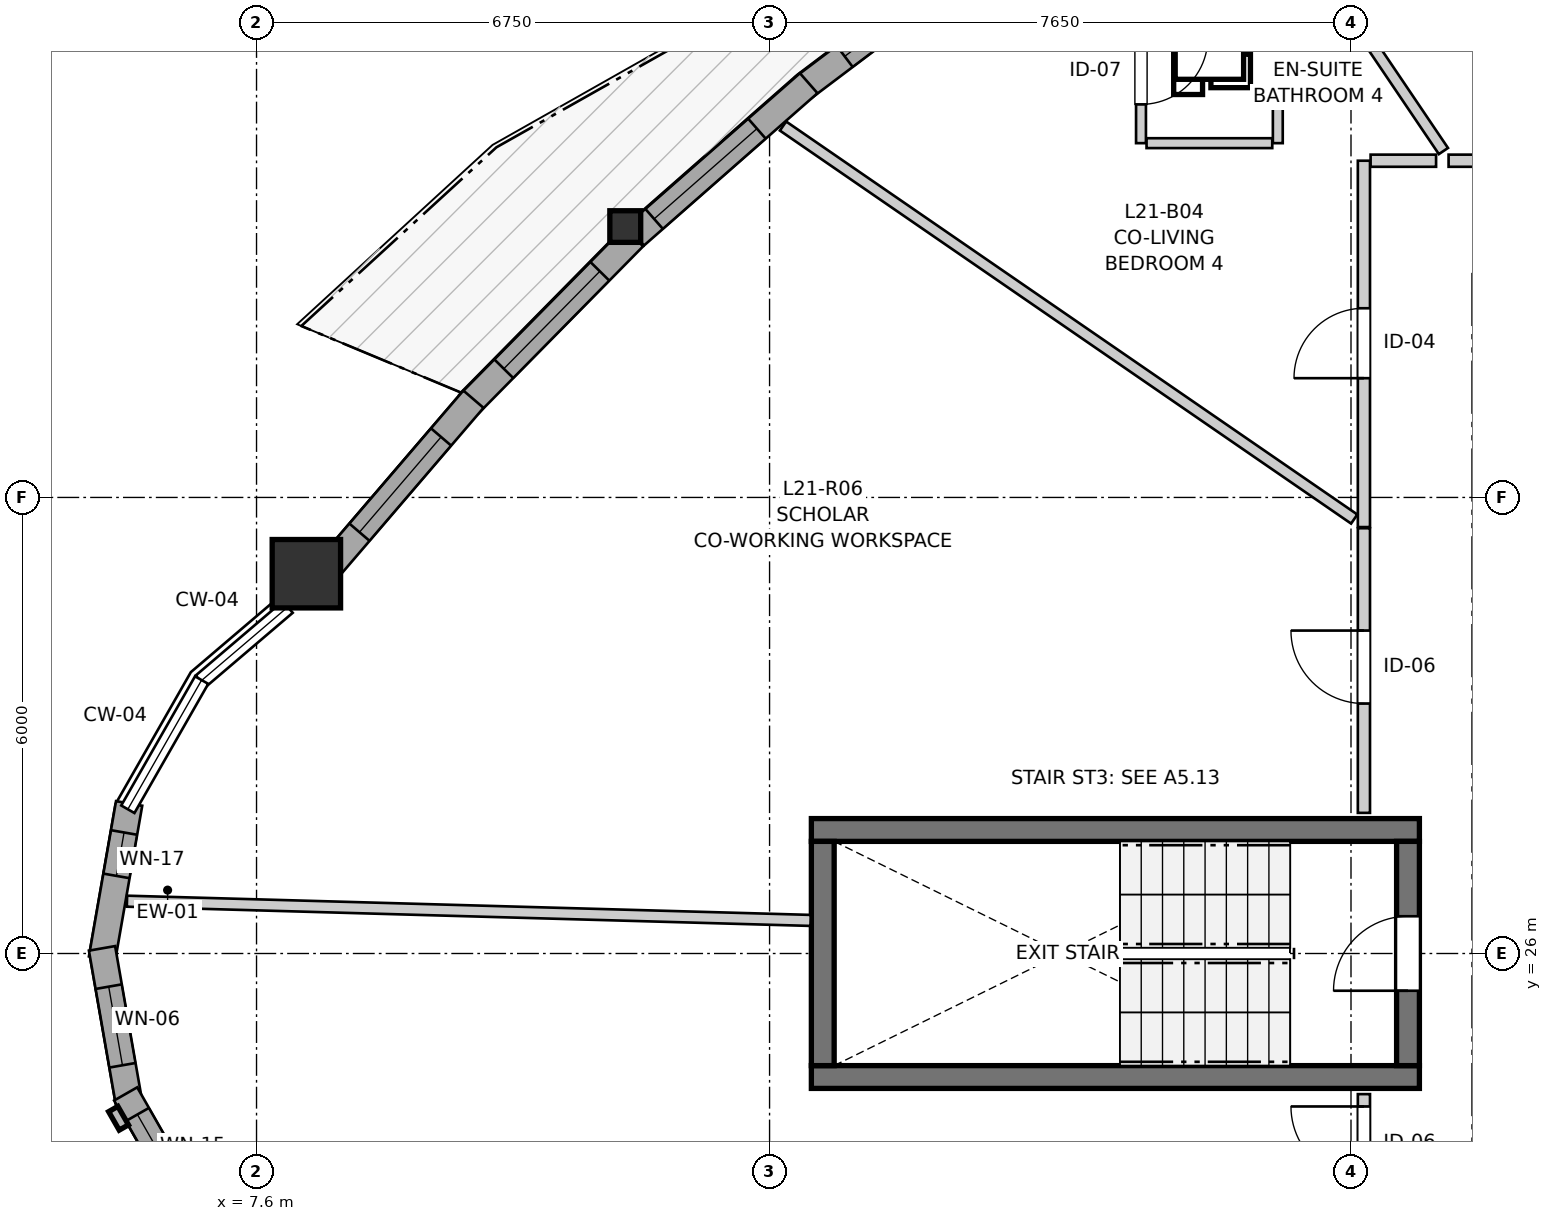
"""IFC4 building model, lengths in metres.
Left out: names, types, materials, properties, quantities, classifications, styles, units other than length and angle.
Written with IfcOpenShell. Run it as: python <this file> out.ifc"""

import sys

from ifc_helpers import new_model, si_unit, direction, frame, frame_2d, origin, origin_2d, place, context, subcontext, project, spatial, rectangle, i_section, extrude, source, transform, mapped, element, fill, save


model = new_model("IFC4")
c1 = context("Model", 3, precision=1e-05, world=origin(), true_north=direction((0.0, 1.0)))
c2 = subcontext(c1, "Body", "Model", "MODEL_VIEW")
j1 = project(units=[si_unit("LENGTHUNIT", "METRE"), si_unit("PLANEANGLEUNIT", "RADIAN")], contexts=[c1])
p1 = place(None, origin())
s1 = spatial("IfcSite", under=j1, at=p1, CompositionType="ELEMENT")
p2 = place(p1, origin())
s2 = spatial("IfcBuilding", under=s1, at=p2, CompositionType="ELEMENT")
p3 = place(p2, frame((0.0, 0.0, 73.6)))
s3 = spatial("IfcBuildingStorey", under=s2, at=p3, CompositionType="ELEMENT", Elevation=73.6)
for number, where, z_axis, x_axis in (
    (1, (14.9, 24.375, 0.0), (0.0, 0.0, 1.0), (1.0, 0.0, 0.0)),
    (2, (22.9, 27.625, 0.0), (0.0, 0.0, 1.0), (-1.0, 0.0, 0.0)),
):
    element("IfcWall", number, at=place(p3, frame(where, z_axis=z_axis, x_axis=x_axis)), inside=s3, PredefinedType="SHEAR", context=c2, shape_type="SweptSolid", body=[
        extrude(rectangle(XDim=8.0, YDim=0.3, at=frame_2d((4.0, 0.0))), origin(), (0.0, 0.0, 1.0), 2.95),
    ])
p4 = place(p3, frame((15.05, 27.475, 0.0), z_axis=(0.0, 0.0, 1.0), x_axis=(0.0, -1.0, 0.0)))
e3 = element("IfcWall", 3, at=p4, inside=s3, PredefinedType="SHEAR", context=c2, shape_type="SweptSolid", body=[
    extrude(rectangle(XDim=2.95, YDim=0.3, at=frame_2d((1.475, 0.0))), origin(), (0.0, 0.0, 1.0), 2.95),
])
p5 = place(p3, frame((22.75, 24.525, 0.0), z_axis=(0.0, 0.0, 1.0), x_axis=(0.0, 1.0, 0.0)))
e4 = element("IfcWall", 4, at=p5, inside=s3, PredefinedType="SHEAR", context=c2, shape_type="SweptSolid", body=[
    extrude(rectangle(XDim=2.95, YDim=0.3, at=frame_2d((1.475, 0.0))), origin(), (0.0, 0.0, 1.0), 2.95),
])
p6 = place(p5, frame((0.985, 0.0, 0.0)))
e5 = element("IfcOpeningElement", 5, at=p6, cuts=e4, PredefinedType="OPENING", context=c2, shape_type="SweptSolid", body=[
    extrude(rectangle(XDim=0.98, YDim=2.15, at=frame_2d((0.49, 1.075))), frame((0.0, 0.16, 0.0), z_axis=(0.0, -1.0, 0.0), x_axis=(1.0, 0.0, 0.0)), (0.0, 0.0, 1.0), 0.32),
])
m1 = source(origin(), c2, "Body", "SweptSolid", [
    extrude(rectangle(XDim=0.9, YDim=0.9, at=origin_2d()), origin(), (0.0, 0.0, 1.0), 2.95),
])
p7 = place(p3, frame((8.256, 30.997, 0.0), z_axis=(0.0, 0.0, 1.0), x_axis=(1.0, 0.0, 0.0)))
e6 = element("IfcColumn", 6, at=p7, inside=s3, PredefinedType="COLUMN", context=c2, shape_type="MappedRepresentation", body=[
    mapped(m1, transform((0.0, 0.0, 0.0), x_axis=(1.0, 0.0, 0.0), y_axis=(0.0, 1.0, 0.0), z_axis=(0.0, 0.0, 1.0), scale=1.0)),
])
m2 = source(origin(), c2, "Body", "SweptSolid", [
    extrude(i_section(OverallWidth=0.406, OverallDepth=0.416, WebThickness=0.027, FlangeThickness=0.044, FilletRadius=0.015, at=origin_2d()), origin(), (0.0, 0.0, 1.0), 2.95),
])
p8 = place(p3, frame((12.451, 35.564, 0.0), z_axis=(0.0, 0.0, 1.0), x_axis=(1.0, 0.0, 0.0)))
e7 = element("IfcColumn", 7, at=p8, inside=s3, PredefinedType="PILASTER", context=c2, shape_type="MappedRepresentation", body=[
    mapped(m2, transform((0.0, 0.0, 0.0), x_axis=(1.0, 0.0, 0.0), y_axis=(0.0, 1.0, 0.0), z_axis=(0.0, 0.0, 1.0), scale=1.0)),
])
p9 = place(p3, frame((5.924, 27.975, 0.0), z_axis=(0.0, 0.0, 1.0), x_axis=(-0.172166087538, -0.985067935881, 0.0)))
e8 = element("IfcWall", 8, at=p9, inside=s3, PredefinedType="SOLIDWALL", context=c2, shape_type="SweptSolid", body=[
    extrude(rectangle(XDim=2.073, YDim=0.35, at=frame_2d((1.037, 0.0))), origin(), (0.0, 0.0, 1.0), 2.48),
])
p10 = place(p9, frame((0.388, 0.0, 0.82)))
e9 = element("IfcOpeningElement", 9, at=p10, cuts=e8, PredefinedType="OPENING", context=c2, shape_type="SweptSolid", body=[
    extrude(rectangle(XDim=0.58, YDim=1.35, at=frame_2d((0.29, 0.675))), frame((0.0, 0.185, 0.0), z_axis=(0.0, -1.0, 0.0), x_axis=(1.0, 0.0, 0.0)), (0.0, 0.0, 1.0), 0.37),
])
p11 = place(p3, frame((5.567, 26.068, 0.0), z_axis=(0.0, 0.0, 1.0), x_axis=(0.172166087538, -0.985067935881, 0.0)))
e10 = element("IfcWall", 10, at=p11, inside=s3, PredefinedType="SOLIDWALL", context=c2, shape_type="SweptSolid", body=[
    extrude(rectangle(XDim=2.073, YDim=0.35, at=frame_2d((1.037, 0.0))), origin(), (0.0, 0.0, 1.0), 2.48),
])
p12 = place(p11, frame((0.511, 0.0, 0.82)))
e11 = element("IfcOpeningElement", 11, at=p12, cuts=e10, PredefinedType="OPENING", context=c2, shape_type="SweptSolid", body=[
    extrude(rectangle(XDim=1.05, YDim=1.45, at=frame_2d((0.525, 0.725))), frame((0.0, 0.185, 0.0), z_axis=(0.0, -1.0, 0.0), x_axis=(1.0, 0.0, 0.0)), (0.0, 0.0, 1.0), 0.37),
])
p13 = place(p3, frame((5.878, 24.153, 0.0), z_axis=(0.0, 0.0, 1.0), x_axis=(0.496037473582, -0.868301114132, 0.0)))
e12 = element("IfcWall", 12, at=p13, inside=s3, PredefinedType="SOLIDWALL", context=c2, shape_type="SweptSolid", body=[
    extrude(rectangle(XDim=2.073, YDim=0.35, at=frame_2d((1.037, 0.0))), origin(), (0.0, 0.0, 1.0), 2.48),
])
p14 = place(p13, frame((0.312, 0.0, 0.82)))
e13 = element("IfcOpeningElement", 13, at=p14, cuts=e12, PredefinedType="OPENING", context=c2, shape_type="SweptSolid", body=[
    extrude(rectangle(XDim=1.45, YDim=1.25, at=frame_2d((0.725, 0.625))), frame((0.0, 0.185, 0.0), z_axis=(0.0, -1.0, 0.0), x_axis=(1.0, 0.0, 0.0)), (0.0, 0.0, 1.0), 0.37),
])
p15 = place(p3, frame((17.031, 39.079, 0.0), z_axis=(0.0, 0.0, 1.0), x_axis=(-0.798385341516, -0.602146864521, 0.0)))
e14 = element("IfcWall", 14, at=p15, inside=s3, PredefinedType="SOLIDWALL", context=c2, shape_type="SweptSolid", body=[
    extrude(rectangle(XDim=2.799, YDim=0.35, at=frame_2d((1.4, 0.0))), origin(), (0.0, 0.0, 1.0), 2.48),
])
p16 = place(p15, frame((0.67, 0.0, 0.82)))
e15 = element("IfcOpeningElement", 15, at=p16, cuts=e14, PredefinedType="OPENING", context=c2, shape_type="SweptSolid", body=[
    extrude(rectangle(XDim=1.45, YDim=1.25, at=frame_2d((0.725, 0.625))), frame((0.0, 0.185, 0.0), z_axis=(0.0, -1.0, 0.0), x_axis=(1.0, 0.0, 0.0)), (0.0, 0.0, 1.0), 0.37),
])
p17 = place(p3, frame((14.865, 37.45, 0.0), z_axis=(0.0, 0.0, 1.0), x_axis=(-0.751505335107, -0.659727012715, 0.0)))
e16 = element("IfcWall", 16, at=p17, inside=s3, PredefinedType="SOLIDWALL", context=c2, shape_type="SweptSolid", body=[
    extrude(rectangle(XDim=3.038, YDim=0.35, at=frame_2d((1.519, 0.0))), origin(), (0.0, 0.0, 1.0), 2.48),
])
p18 = place(p17, frame((0.906, 0.0, 0.82)))
e17 = element("IfcOpeningElement", 17, at=p18, cuts=e16, PredefinedType="OPENING", context=c2, shape_type="SweptSolid", body=[
    extrude(rectangle(XDim=1.8, YDim=1.45, at=frame_2d((0.9, 0.725))), frame((0.0, 0.185, 0.0), z_axis=(0.0, -1.0, 0.0), x_axis=(1.0, 0.0, 0.0)), (0.0, 0.0, 1.0), 0.37),
])
p19 = place(p3, frame((12.562, 35.427, 0.0), z_axis=(0.0, 0.0, 1.0), x_axis=(-0.701949387032, -0.712226830473, 0.0)))
e18 = element("IfcWall", 18, at=p19, inside=s3, PredefinedType="SOLIDWALL", context=c2, shape_type="SweptSolid", body=[
    extrude(rectangle(XDim=3.088, YDim=0.35, at=frame_2d((1.544, 0.0))), origin(), (0.0, 0.0, 1.0), 2.48),
])
p20 = place(p19, frame((0.634, 0.0, 0.82)))
e19 = element("IfcOpeningElement", 19, at=p20, cuts=e18, PredefinedType="OPENING", context=c2, shape_type="SweptSolid", body=[
    extrude(rectangle(XDim=1.8, YDim=1.45, at=frame_2d((0.9, 0.725))), frame((0.0, 0.185, 0.0), z_axis=(0.0, -1.0, 0.0), x_axis=(1.0, 0.0, 0.0)), (0.0, 0.0, 1.0), 0.37),
])
p21 = place(p3, frame((10.454, 33.292, 0.0), z_axis=(0.0, 0.0, 1.0), x_axis=(-0.650791373456, -0.759256602365, 0.0)))
e20 = element("IfcWall", 20, at=p21, inside=s3, PredefinedType="SOLIDWALL", context=c2, shape_type="SweptSolid", body=[
    extrude(rectangle(XDim=2.949, YDim=0.35, at=frame_2d((1.474, 0.0))), origin(), (0.0, 0.0, 1.0), 2.48),
])
p22 = place(p21, frame((0.654, 0.0, 0.82)))
e21 = element("IfcOpeningElement", 21, at=p22, cuts=e20, PredefinedType="OPENING", context=c2, shape_type="SweptSolid", body=[
    extrude(rectangle(XDim=1.65, YDim=1.45, at=frame_2d((0.825, 0.725))), frame((0.0, 0.185, 0.0), z_axis=(0.0, -1.0, 0.0), x_axis=(1.0, 0.0, 0.0)), (0.0, 0.0, 1.0), 0.37),
])
p23 = place(p3, frame((23.284, 36.43, 0.0), z_axis=(0.0, 0.0, 1.0), x_axis=(1.0, 0.0, 0.0)))
e22 = element("IfcWall", 22, at=p23, inside=s3, PredefinedType="PARTITIONING", context=c2, shape_type="SweptSolid", body=[
    extrude(rectangle(XDim=4.845, YDim=0.16, at=frame_2d((2.422, 0.0))), origin(), (0.0, 0.0, 1.0), 2.588),
])
p24 = place(p23, frame((1.963, 0.0, 0.0)))
e23 = element("IfcOpeningElement", 23, at=p24, cuts=e22, PredefinedType="OPENING", context=c2, shape_type="SweptSolid", body=[
    extrude(rectangle(XDim=0.92, YDim=2.1, at=frame_2d((0.46, 1.05))), frame((0.0, 0.09, 0.0), z_axis=(0.0, -1.0, 0.0), x_axis=(1.0, 0.0, 0.0)), (0.0, 0.0, 1.0), 0.18),
])
p25 = place(p3, frame((22.17, 31.61, 0.0), z_axis=(0.0, 0.0, 1.0), x_axis=(0.0, 1.0, 0.0)))
e24 = element("IfcWall", 24, at=p25, inside=s3, PredefinedType="PARTITIONING", context=c2, shape_type="SweptSolid", body=[
    extrude(rectangle(XDim=4.82, YDim=0.16, at=frame_2d((2.41, 0.0))), origin(), (0.0, 0.0, 1.0), 2.95),
])
p26 = place(p25, frame((1.959, 0.0, 0.0)))
e25 = element("IfcOpeningElement", 25, at=p26, cuts=e24, PredefinedType="OPENING", context=c2, shape_type="SweptSolid", body=[
    extrude(rectangle(XDim=0.92, YDim=2.1, at=frame_2d((0.46, 1.05))), frame((0.0, 0.09, 0.0), z_axis=(0.0, -1.0, 0.0), x_axis=(1.0, 0.0, 0.0)), (0.0, 0.0, 1.0), 0.18),
])
p27 = place(p3, frame((22.17, 27.85, 0.0), z_axis=(0.0, 0.0, 1.0), x_axis=(0.0, 1.0, 0.0)))
e26 = element("IfcWall", 26, at=p27, inside=s3, PredefinedType="PARTITIONING", context=c2, shape_type="SweptSolid", body=[
    extrude(rectangle(XDim=3.745, YDim=0.16, at=frame_2d((1.873, 0.0))), origin(), (0.0, 0.0, 1.0), 2.95),
])
p28 = place(p27, frame((1.438, 0.0, 0.0)))
e27 = element("IfcOpeningElement", 27, at=p28, cuts=e26, PredefinedType="OPENING", context=c2, shape_type="SweptSolid", body=[
    extrude(rectangle(XDim=0.96, YDim=2.1, at=frame_2d((0.48, 1.05))), frame((0.0, 0.09, 0.0), z_axis=(0.0, -1.0, 0.0), x_axis=(1.0, 0.0, 0.0)), (0.0, 0.0, 1.0), 0.18),
])
p29 = place(p3, frame((19.237, 38.561, 0.0), z_axis=(0.0, 0.0, 1.0), x_axis=(0.0, -1.0, 0.0)))
e28 = element("IfcWall", 28, at=p29, inside=s3, PredefinedType="PARTITIONING", context=c2, shape_type="SweptSolid", body=[
    extrude(rectangle(XDim=1.9, YDim=0.13, at=frame_2d((0.95, 0.0))), origin(), (0.0, 0.0, 1.0), 2.95),
])
p30 = place(p29, frame((0.51, 0.0, 0.0)))
e29 = element("IfcOpeningElement", 29, at=p30, cuts=e28, PredefinedType="OPENING", context=c2, shape_type="SweptSolid", body=[
    extrude(rectangle(XDim=0.88, YDim=2.05, at=frame_2d((0.44, 1.025))), frame((0.0, 0.075, 0.0), z_axis=(0.0, -1.0, 0.0), x_axis=(1.0, 0.0, 0.0)), (0.0, 0.0, 1.0), 0.15),
])
p31 = place(p3, frame((22.17, 22.829, 0.0), z_axis=(0.0, 0.0, 1.0), x_axis=(0.0, 1.0, 0.0)))
e30 = element("IfcWall", 30, at=p31, inside=s3, PredefinedType="PARTITIONING", context=c2, shape_type="SweptSolid", body=[
    extrude(rectangle(XDim=1.321, YDim=0.16, at=frame_2d((0.66, 0.0))), origin(), (0.0, 0.0, 1.0), 2.95),
])
p32 = place(p31, frame((0.198, 0.0, 0.0)))
e31 = element("IfcOpeningElement", 31, at=p32, cuts=e30, PredefinedType="OPENING", context=c2, shape_type="SweptSolid", body=[
    extrude(rectangle(XDim=0.96, YDim=2.1, at=frame_2d((0.48, 1.05))), frame((0.0, 0.09, 0.0), z_axis=(0.0, -1.0, 0.0), x_axis=(1.0, 0.0, 0.0)), (0.0, 0.0, 1.0), 0.18),
])
p33 = place(p3, frame((14.527, 36.886, 0.0), z_axis=(0.0, 0.0, 1.0), x_axis=(0.823849772282, -0.566808215106, 0.0)))
e32 = element("IfcWall", 32, at=p33, inside=s3, PredefinedType="PARTITIONING", context=c2, shape_type="SweptSolid", body=[
    extrude(rectangle(XDim=9.122, YDim=0.145, at=frame_2d((4.561, 0.0))), origin(), (0.0, 0.0, 1.0), 2.95),
])
p34 = place(p3, frame((5.896, 26.688, 0.0), z_axis=(0.0, 0.0, 1.0), x_axis=(0.999604843423, -0.028109731489, 0.0)))
e33 = element("IfcWall", 33, at=p34, inside=s3, PredefinedType="PARTITIONING", context=c2, shape_type="SweptSolid", body=[
    extrude(rectangle(XDim=8.998, YDim=0.145, at=frame_2d((4.499, 0.0))), origin(), (0.0, 0.0, 1.0), 2.95),
])
p35 = place(p3, frame((20.277, 40.906, 0.0), z_axis=(0.0, 0.0, 1.0), x_axis=(0.559905741259, -0.828556311246, 0.0)))
e34 = element("IfcWall", 34, at=p35, inside=s3, PredefinedType="PARTITIONING", context=c2, shape_type="SweptSolid", body=[
    extrude(rectangle(XDim=5.249, YDim=0.145, at=frame_2d((2.625, 0.0))), origin(), (0.0, 0.0, 1.0), 2.95),
])
p36 = place(p3, frame((21.037, 36.661, 0.0), z_axis=(0.0, 0.0, 1.0), x_axis=(0.0, 1.0, 0.0)))
e35 = element("IfcWall", 35, at=p36, inside=s3, PredefinedType="PARTITIONING", context=c2, shape_type="SweptSolid", body=[
    extrude(rectangle(XDim=1.9, YDim=0.13, at=frame_2d((0.95, 0.0))), origin(), (0.0, 0.0, 1.0), 2.95),
])
p37 = place(p3, frame((19.31, 36.661, 0.0), z_axis=(0.0, 0.0, 1.0), x_axis=(1.0, 0.0, 0.0)))
e36 = element("IfcWall", 36, at=p37, inside=s3, PredefinedType="PARTITIONING", context=c2, shape_type="SweptSolid", body=[
    extrude(rectangle(XDim=1.654, YDim=0.13, at=frame_2d((0.827, 0.0))), origin(), (0.0, 0.0, 1.0), 2.95),
])
p38 = place(p3, frame((22.258, 36.43, 0.0), z_axis=(0.0, 0.0, 1.0), x_axis=(1.0, 0.0, 0.0)))
e37 = element("IfcWall", 37, at=p38, inside=s3, PredefinedType="PARTITIONING", context=c2, shape_type="SweptSolid", body=[
    extrude(rectangle(XDim=0.861, YDim=0.16, at=frame_2d((0.431, 0.0))), origin(), (0.0, 0.0, 1.0), 2.95),
])
m3 = source(origin(), c2, "Body", "SweptSolid", [
    extrude(rectangle(XDim=0.58, YDim=1.35, at=frame_2d((0.29, 0.675))), frame((0.0, 0.03, 0.0), z_axis=(0.0, -1.0, 0.0), x_axis=(1.0, 0.0, 0.0)), (0.0, 0.0, 1.0), 0.06),
])
p39 = place(p10, origin())
e38 = element("IfcWindow", 38, at=p39, inside=s3, PartitioningType="SINGLE_PANEL", PredefinedType="WINDOW", context=c2, shape_type="MappedRepresentation", body=[
    mapped(m3, transform((0.0, 0.0, 0.0), x_axis=(1.0, 0.0, 0.0), y_axis=(0.0, 1.0, 0.0), z_axis=(0.0, 0.0, 1.0), scale=1.0)),
])
fill(e9, e38)
m4 = source(origin(), c2, "Body", "SweptSolid", [
    extrude(rectangle(XDim=1.05, YDim=1.45, at=frame_2d((0.525, 0.725))), frame((0.0, 0.03, 0.0), z_axis=(0.0, -1.0, 0.0), x_axis=(1.0, 0.0, 0.0)), (0.0, 0.0, 1.0), 0.06),
])
p40 = place(p12, origin())
e39 = element("IfcWindow", 39, at=p40, inside=s3, PartitioningType="SINGLE_PANEL", PredefinedType="WINDOW", context=c2, shape_type="MappedRepresentation", body=[
    mapped(m4, transform((0.0, 0.0, 0.0), x_axis=(1.0, 0.0, 0.0), y_axis=(0.0, 1.0, 0.0), z_axis=(0.0, 0.0, 1.0), scale=1.0)),
])
fill(e11, e39)
m5 = source(origin(), c2, "Body", "SweptSolid", [
    extrude(rectangle(XDim=1.45, YDim=1.25, at=frame_2d((0.725, 0.625))), frame((0.0, 0.03, 0.0), z_axis=(0.0, -1.0, 0.0), x_axis=(1.0, 0.0, 0.0)), (0.0, 0.0, 1.0), 0.06),
])
p41 = place(p14, origin())
e40 = element("IfcWindow", 40, at=p41, inside=s3, PartitioningType="SINGLE_PANEL", PredefinedType="WINDOW", context=c2, shape_type="MappedRepresentation", body=[
    mapped(m5, transform((0.0, 0.0, 0.0), x_axis=(1.0, 0.0, 0.0), y_axis=(0.0, 1.0, 0.0), z_axis=(0.0, 0.0, 1.0), scale=1.0)),
])
fill(e13, e40)
p42 = place(p16, origin())
e41 = element("IfcWindow", 41, at=p42, inside=s3, PartitioningType="SINGLE_PANEL", PredefinedType="WINDOW", context=c2, shape_type="MappedRepresentation", body=[
    mapped(m5, transform((0.0, 0.0, 0.0), x_axis=(1.0, 0.0, 0.0), y_axis=(0.0, 1.0, 0.0), z_axis=(0.0, 0.0, 1.0), scale=1.0)),
])
fill(e15, e41)
m6 = source(origin(), c2, "Body", "SweptSolid", [
    extrude(rectangle(XDim=1.8, YDim=1.45, at=frame_2d((0.9, 0.725))), frame((0.0, 0.03, 0.0), z_axis=(0.0, -1.0, 0.0), x_axis=(1.0, 0.0, 0.0)), (0.0, 0.0, 1.0), 0.06),
])
p43 = place(p18, origin())
e42 = element("IfcWindow", 42, at=p43, inside=s3, PartitioningType="SINGLE_PANEL", PredefinedType="WINDOW", context=c2, shape_type="MappedRepresentation", body=[
    mapped(m6, transform((0.0, 0.0, 0.0), x_axis=(1.0, 0.0, 0.0), y_axis=(0.0, 1.0, 0.0), z_axis=(0.0, 0.0, 1.0), scale=1.0)),
])
fill(e17, e42)
p44 = place(p20, origin())
e43 = element("IfcWindow", 43, at=p44, inside=s3, PartitioningType="SINGLE_PANEL", PredefinedType="WINDOW", context=c2, shape_type="MappedRepresentation", body=[
    mapped(m6, transform((0.0, 0.0, 0.0), x_axis=(1.0, 0.0, 0.0), y_axis=(0.0, 1.0, 0.0), z_axis=(0.0, 0.0, 1.0), scale=1.0)),
])
fill(e19, e43)
m7 = source(origin(), c2, "Body", "SweptSolid", [
    extrude(rectangle(XDim=1.65, YDim=1.45, at=frame_2d((0.825, 0.725))), frame((0.0, 0.03, 0.0), z_axis=(0.0, -1.0, 0.0), x_axis=(1.0, 0.0, 0.0)), (0.0, 0.0, 1.0), 0.06),
])
p45 = place(p22, origin())
e44 = element("IfcWindow", 44, at=p45, inside=s3, PartitioningType="SINGLE_PANEL", PredefinedType="WINDOW", context=c2, shape_type="MappedRepresentation", body=[
    mapped(m7, transform((0.0, 0.0, 0.0), x_axis=(1.0, 0.0, 0.0), y_axis=(0.0, 1.0, 0.0), z_axis=(0.0, 0.0, 1.0), scale=1.0)),
])
fill(e21, e44)
m8 = source(origin(), c2, "Body", "SweptSolid", [
    extrude(rectangle(XDim=0.98, YDim=2.15, at=frame_2d((0.49, 1.075))), frame((0.0, 0.025, 0.0), z_axis=(0.0, -1.0, 0.0), x_axis=(1.0, 0.0, 0.0)), (0.0, 0.0, 1.0), 0.05),
])
p46 = place(p6, origin())
e45 = element("IfcDoor", 45, at=p46, inside=s3, OperationType="SINGLE_SWING_LEFT", PredefinedType="DOOR", context=c2, shape_type="MappedRepresentation", body=[
    mapped(m8, transform((0.0, 0.0, 0.0), x_axis=(1.0, 0.0, 0.0), y_axis=(0.0, 1.0, 0.0), z_axis=(0.0, 0.0, 1.0), scale=1.0)),
])
fill(e5, e45)
m9 = source(origin(), c2, "Body", "SweptSolid", [
    extrude(rectangle(XDim=0.92, YDim=2.1, at=frame_2d((0.46, 1.05))), frame((0.0, 0.025, 0.0), z_axis=(0.0, -1.0, 0.0), x_axis=(1.0, 0.0, 0.0)), (0.0, 0.0, 1.0), 0.05),
])
p47 = place(p26, origin())
e46 = element("IfcDoor", 46, at=p47, inside=s3, OperationType="SINGLE_SWING_LEFT", PredefinedType="DOOR", context=c2, shape_type="MappedRepresentation", body=[
    mapped(m9, transform((0.0, 0.0, 0.0), x_axis=(1.0, 0.0, 0.0), y_axis=(0.0, 1.0, 0.0), z_axis=(0.0, 0.0, 1.0), scale=1.0)),
])
fill(e25, e46)
m10 = source(origin(), c2, "Body", "SweptSolid", [
    extrude(rectangle(XDim=0.96, YDim=2.1, at=frame_2d((0.48, 1.05))), frame((0.0, 0.025, 0.0), z_axis=(0.0, -1.0, 0.0), x_axis=(1.0, 0.0, 0.0)), (0.0, 0.0, 1.0), 0.05),
])
p48 = place(p28, origin())
e47 = element("IfcDoor", 47, at=p48, inside=s3, OperationType="SINGLE_SWING_RIGHT", PredefinedType="DOOR", context=c2, shape_type="MappedRepresentation", body=[
    mapped(m10, transform((0.0, 0.0, 0.0), x_axis=(1.0, 0.0, 0.0), y_axis=(0.0, 1.0, 0.0), z_axis=(0.0, 0.0, 1.0), scale=1.0)),
])
fill(e27, e47)
m11 = source(origin(), c2, "Body", "SweptSolid", [
    extrude(rectangle(XDim=0.88, YDim=2.05, at=frame_2d((0.44, 1.025))), frame((0.0, 0.025, 0.0), z_axis=(0.0, -1.0, 0.0), x_axis=(1.0, 0.0, 0.0)), (0.0, 0.0, 1.0), 0.05),
])
p49 = place(p30, origin())
e48 = element("IfcDoor", 48, at=p49, inside=s3, OperationType="SINGLE_SWING_LEFT", PredefinedType="DOOR", context=c2, shape_type="MappedRepresentation", body=[
    mapped(m11, transform((0.0, 0.0, 0.0), x_axis=(1.0, 0.0, 0.0), y_axis=(0.0, 1.0, 0.0), z_axis=(0.0, 0.0, 1.0), scale=1.0)),
])
fill(e29, e48)
p50 = place(p32, origin())
e49 = element("IfcDoor", 49, at=p50, inside=s3, OperationType="SINGLE_SWING_RIGHT", PredefinedType="DOOR", context=c2, shape_type="MappedRepresentation", body=[
    mapped(m10, transform((0.0, 0.0, 0.0), x_axis=(1.0, 0.0, 0.0), y_axis=(0.0, 1.0, 0.0), z_axis=(0.0, 0.0, 1.0), scale=1.0)),
])
fill(e31, e49)
save(model, sys.argv[1])
